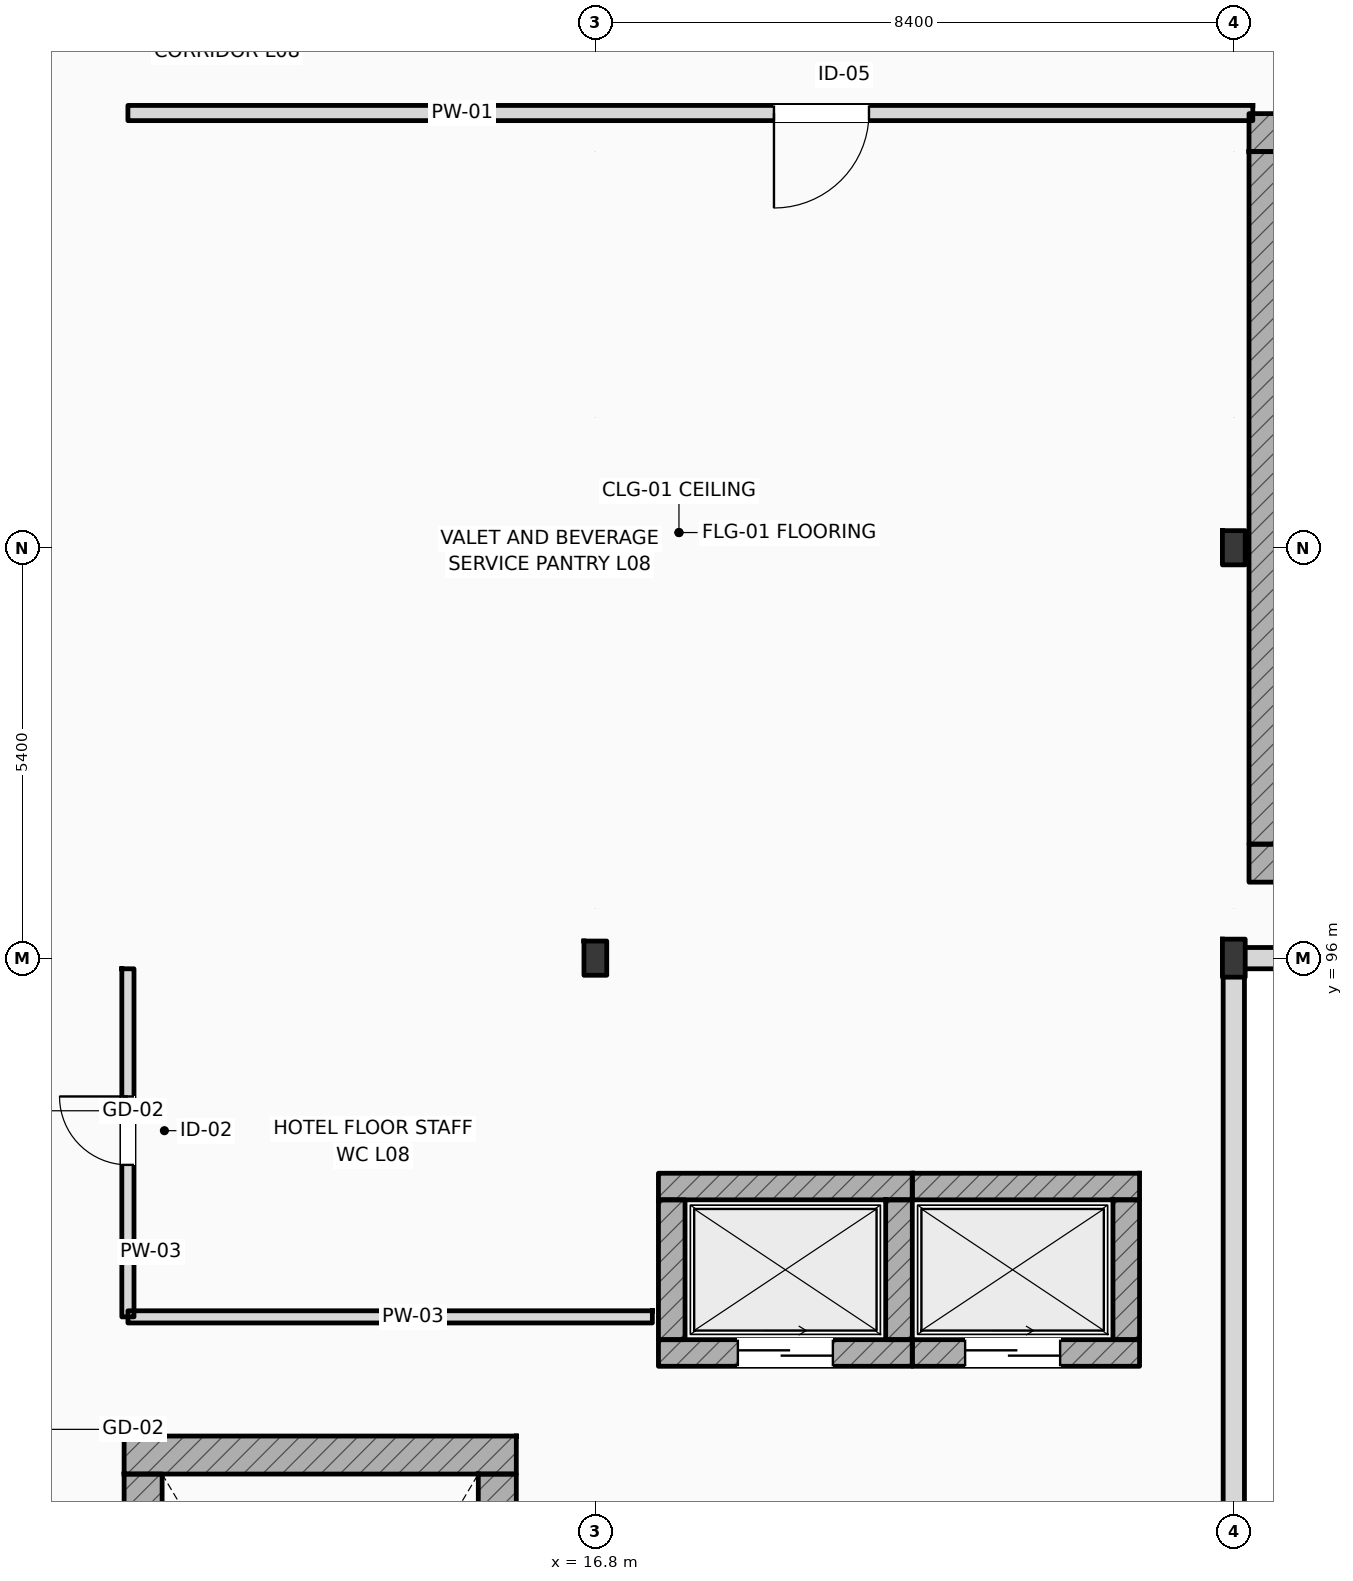
"""IFC4 building model, lengths in metres.
Left out: names, types, materials, properties, quantities, classifications, styles, units other than length and angle.
Written with IfcOpenShell. Run it as: python <this file> out.ifc"""

import sys

from ifc_helpers import new_model, si_unit, direction, frame, frame_2d, origin, origin_2d, place, context, subcontext, project, spatial, rectangle, i_section, extrude, element, fill, save


model = new_model("IFC4")
c1 = context("Model", 3, precision=1e-05, world=origin(), true_north=direction((0.0, 1.0)))
c2 = subcontext(c1, "Body", "Model", "MODEL_VIEW")
j1 = project(units=[si_unit("LENGTHUNIT", "METRE"), si_unit("PLANEANGLEUNIT", "RADIAN")], contexts=[c1])
p1 = place(None, origin())
s1 = spatial("IfcSite", under=j1, at=p1, CompositionType="ELEMENT")
p2 = place(p1, origin())
s2 = spatial("IfcBuilding", under=s1, at=p2, CompositionType="ELEMENT")
p3 = place(p2, frame((0.0, 0.0, 35.4)))
s3 = spatial("IfcBuildingStorey", under=s2, at=p3, CompositionType="ELEMENT", Elevation=35.4)
p4 = place(p3, frame((16.8, 96.0, 0.0), z_axis=(0.0, 0.0, 1.0), x_axis=(1.0, 0.0, 0.0)))
e1 = element("IfcColumn", 1, at=p4, inside=s3, PredefinedType="COLUMN", context=c2, shape_type="SweptSolid", body=[
    extrude(i_section(OverallWidth=0.3, OverallDepth=0.45, WebThickness=0.014, FlangeThickness=0.026, FilletRadius=0.027, at=origin_2d()), origin(), (0.0, 0.0, 1.0), 3.6),
])
p5 = place(p3, frame((25.2, 96.0, 0.0), z_axis=(0.0, 0.0, 1.0), x_axis=(1.0, 0.0, 0.0)))
e2 = element("IfcColumn", 2, at=p5, inside=s3, PredefinedType="COLUMN", context=c2, shape_type="SweptSolid", body=[
    extrude(i_section(OverallWidth=0.3, OverallDepth=0.5, WebThickness=0.014, FlangeThickness=0.028, FilletRadius=0.027, at=origin_2d()), origin(), (0.0, 0.0, 1.0), 3.6),
])
for number, where, z_axis, x_axis in (
    (3, (16.8, 101.4, 0.0), (0.0, 0.0, 1.0), (1.0, 0.0, 0.0)),
    (4, (25.2, 101.4, 0.0), (0.0, 0.0, 1.0), (1.0, 0.0, 0.0)),
):
    element("IfcColumn", number, at=place(p3, frame(where, z_axis=z_axis, x_axis=x_axis)), inside=s3, PredefinedType="COLUMN", context=c2, shape_type="SweptSolid", body=[
        extrude(i_section(OverallWidth=0.3, OverallDepth=0.45, WebThickness=0.014, FlangeThickness=0.026, FilletRadius=0.027, at=origin_2d()), origin(), (0.0, 0.0, 1.0), 3.6),
    ])
p6 = place(p3, frame((10.6, 89.462, 0.0), z_axis=(0.0, 0.0, 1.0), x_axis=(1.0, 0.0, 0.0)))
e5 = element("IfcWall", 5, at=p6, inside=s3, PredefinedType="SHEAR", context=c2, shape_type="SweptSolid", body=[
    extrude(rectangle(XDim=5.16, YDim=0.5, at=frame_2d((2.58, 0.0))), origin(), (0.0, 0.0, 1.0), 3.6),
])
p7 = place(p3, frame((10.85, 80.1, 0.0), z_axis=(0.0, 0.0, 1.0), x_axis=(0.0, 1.0, 0.0)))
e6 = element("IfcWall", 6, at=p7, inside=s3, PredefinedType="SHEAR", context=c2, shape_type="SweptSolid", body=[
    extrude(rectangle(XDim=9.112, YDim=0.5, at=frame_2d((4.556, 0.0))), origin(), (0.0, 0.0, 1.0), 3.6),
])
p8 = place(p3, frame((15.51, 80.1, 0.0), z_axis=(0.0, 0.0, 1.0), x_axis=(0.0, 1.0, 0.0)))
e7 = element("IfcWall", 7, at=p8, inside=s3, PredefinedType="SHEAR", context=c2, shape_type="SweptSolid", body=[
    extrude(rectangle(XDim=9.112, YDim=0.5, at=frame_2d((4.556, 0.0))), origin(), (0.0, 0.0, 1.0), 3.6),
])
p9 = place(p8, frame((0.44, 0.0, 0.0)))
e8 = element("IfcOpeningElement", 8, at=p9, cuts=e7, PredefinedType="OPENING", context=c2, shape_type="SweptSolid", body=[
    extrude(rectangle(XDim=1.1, YDim=2.2, at=frame_2d((0.55, 1.1))), frame((0.0, 0.26, 0.0), z_axis=(0.0, -1.0, 0.0), x_axis=(1.0, 0.0, 0.0)), (0.0, 0.0, 1.0), 0.52),
])
for number, where, z_axis, x_axis in (
    (9, (25.4, 106.862, 0.0), (0.0, 0.0, 1.0), (1.0, 0.0, 0.0)),
    (10, (25.4, 97.25, 0.0), (0.0, 0.0, 1.0), (1.0, 0.0, 0.0)),
):
    element("IfcWall", number, at=place(p3, frame(where, z_axis=z_axis, x_axis=x_axis)), inside=s3, PredefinedType="SHEAR", context=c2, shape_type="SweptSolid", body=[
        extrude(rectangle(XDim=5.16, YDim=0.5, at=frame_2d((2.58, 0.0))), origin(), (0.0, 0.0, 1.0), 3.6),
    ])
p10 = place(p3, frame((25.65, 97.5, 0.0), z_axis=(0.0, 0.0, 1.0), x_axis=(0.0, 1.0, 0.0)))
e11 = element("IfcWall", 11, at=p10, inside=s3, PredefinedType="SHEAR", context=c2, shape_type="SweptSolid", body=[
    extrude(rectangle(XDim=9.112, YDim=0.5, at=frame_2d((4.556, 0.0))), origin(), (0.0, 0.0, 1.0), 3.6),
])
p11 = place(p3, frame((25.2, 96.0, 0.0), z_axis=(0.0, 0.0, 1.0), x_axis=(1.0, 0.0, 0.0)))
e12 = element("IfcWall", 12, at=p11, inside=s3, PredefinedType="STANDARD", context=c2, shape_type="SweptSolid", body=[
    extrude(rectangle(XDim=70.2, YDim=0.28, at=frame_2d((35.1, 0.0))), origin(), (0.0, 0.0, 1.0), 2.92),
])
p12 = place(p11, frame((16.694, 0.0, 0.9)))
e13 = element("IfcOpeningElement", 13, at=p12, cuts=e12, PredefinedType="OPENING", context=c2, shape_type="SweptSolid", body=[
    extrude(rectangle(XDim=1.8, YDim=1.84, at=frame_2d((0.9, 0.92))), frame((0.0, 0.15, 0.0), z_axis=(0.0, -1.0, 0.0), x_axis=(1.0, 0.0, 0.0)), (0.0, 0.0, 1.0), 0.3),
])
p13 = place(p11, frame((20.482, 0.0, 0.9)))
e14 = element("IfcOpeningElement", 14, at=p13, cuts=e12, PredefinedType="OPENING", context=c2, shape_type="SweptSolid", body=[
    extrude(rectangle(XDim=1.95, YDim=1.84, at=frame_2d((0.975, 0.92))), frame((0.0, 0.15, 0.0), z_axis=(0.0, -1.0, 0.0), x_axis=(1.0, 0.0, 0.0)), (0.0, 0.0, 1.0), 0.3),
])
p14 = place(p11, frame((24.316, 0.0, 0.9)))
e15 = element("IfcOpeningElement", 15, at=p14, cuts=e12, PredefinedType="OPENING", context=c2, shape_type="SweptSolid", body=[
    extrude(rectangle(XDim=2.1, YDim=1.84, at=frame_2d((1.05, 0.92))), frame((0.0, 0.15, 0.0), z_axis=(0.0, -1.0, 0.0), x_axis=(1.0, 0.0, 0.0)), (0.0, 0.0, 1.0), 0.3),
])
p15 = place(p11, frame((28.149, 0.0, 0.9)))
e16 = element("IfcOpeningElement", 16, at=p15, cuts=e12, PredefinedType="OPENING", context=c2, shape_type="SweptSolid", body=[
    extrude(rectangle(XDim=2.25, YDim=1.84, at=frame_2d((1.125, 0.92))), frame((0.0, 0.15, 0.0), z_axis=(0.0, -1.0, 0.0), x_axis=(1.0, 0.0, 0.0)), (0.0, 0.0, 1.0), 0.3),
])
p16 = place(p11, frame((31.983, 0.0, 0.9)))
e17 = element("IfcOpeningElement", 17, at=p16, cuts=e12, PredefinedType="OPENING", context=c2, shape_type="SweptSolid", body=[
    extrude(rectangle(XDim=2.4, YDim=1.84, at=frame_2d((1.2, 0.92))), frame((0.0, 0.15, 0.0), z_axis=(0.0, -1.0, 0.0), x_axis=(1.0, 0.0, 0.0)), (0.0, 0.0, 1.0), 0.3),
])
p17 = place(p11, frame((35.682, 0.0, 0.9)))
e18 = element("IfcOpeningElement", 18, at=p17, cuts=e12, PredefinedType="OPENING", context=c2, shape_type="SweptSolid", body=[
    extrude(rectangle(XDim=2.508, YDim=1.84, at=frame_2d((1.254, 0.92))), frame((0.0, 0.15, 0.0), z_axis=(0.0, -1.0, 0.0), x_axis=(1.0, 0.0, 0.0)), (0.0, 0.0, 1.0), 0.3),
])
p18 = place(p11, frame((55.56, 0.0, 0.9)))
e19 = element("IfcOpeningElement", 19, at=p18, cuts=e12, PredefinedType="OPENING", context=c2, shape_type="SweptSolid", body=[
    extrude(rectangle(XDim=1.8, YDim=1.84, at=frame_2d((0.9, 0.92))), frame((0.0, 0.15, 0.0), z_axis=(0.0, -1.0, 0.0), x_axis=(1.0, 0.0, 0.0)), (0.0, 0.0, 1.0), 0.3),
])
p19 = place(p11, frame((58.628, 0.0, 0.9)))
e20 = element("IfcOpeningElement", 20, at=p19, cuts=e12, PredefinedType="OPENING", context=c2, shape_type="SweptSolid", body=[
    extrude(rectangle(XDim=2.809, YDim=1.84, at=frame_2d((1.405, 0.92))), frame((0.0, 0.15, 0.0), z_axis=(0.0, -1.0, 0.0), x_axis=(1.0, 0.0, 0.0)), (0.0, 0.0, 1.0), 0.3),
])
p20 = place(p11, frame((63.257, 0.0, 0.9)))
e21 = element("IfcOpeningElement", 21, at=p20, cuts=e12, PredefinedType="OPENING", context=c2, shape_type="SweptSolid", body=[
    extrude(rectangle(XDim=1.8, YDim=1.84, at=frame_2d((0.9, 0.92))), frame((0.0, 0.15, 0.0), z_axis=(0.0, -1.0, 0.0), x_axis=(1.0, 0.0, 0.0)), (0.0, 0.0, 1.0), 0.3),
])
p21 = place(p11, frame((66.453, 0.0, 0.9)))
e22 = element("IfcOpeningElement", 22, at=p21, cuts=e12, PredefinedType="OPENING", context=c2, shape_type="SweptSolid", body=[
    extrude(rectangle(XDim=2.737, YDim=1.84, at=frame_2d((1.369, 0.92))), frame((0.0, 0.15, 0.0), z_axis=(0.0, -1.0, 0.0), x_axis=(1.0, 0.0, 0.0)), (0.0, 0.0, 1.0), 0.3),
])
p22 = place(p3, frame((25.2, 79.5, 0.0), z_axis=(0.0, 0.0, 1.0), x_axis=(0.0, 1.0, 0.0)))
e23 = element("IfcWall", 23, at=p22, inside=s3, PredefinedType="STANDARD", context=c2, shape_type="SweptSolid", body=[
    extrude(rectangle(XDim=16.5, YDim=0.28, at=frame_2d((8.25, 0.0))), origin(), (0.0, 0.0, 1.0), 3.01),
])
p23 = place(p3, frame((17.63, 92.995, 0.0), z_axis=(0.0, 0.0, 1.0), x_axis=(1.0, 0.0, 0.0)))
e24 = element("IfcWall", 24, at=p23, inside=s3, PredefinedType="SHEAR", context=c2, shape_type="SweptSolid", body=[
    extrude(rectangle(XDim=3.34, YDim=0.35, at=frame_2d((1.67, 0.0))), origin(), (0.0, 0.0, 1.0), 3.38),
])
p24 = place(p3, frame((17.63, 90.805, 0.0), z_axis=(0.0, 0.0, 1.0), x_axis=(1.0, 0.0, 0.0)))
e25 = element("IfcWall", 25, at=p24, inside=s3, PredefinedType="SHEAR", context=c2, shape_type="SweptSolid", body=[
    extrude(rectangle(XDim=3.34, YDim=0.35, at=frame_2d((1.67, 0.0))), origin(), (0.0, 0.0, 1.0), 3.38),
])
p25 = place(p24, frame((1.045, 0.0, 0.0)))
e26 = element("IfcOpeningElement", 26, at=p25, cuts=e25, PredefinedType="OPENING", context=c2, shape_type="SweptSolid", body=[
    extrude(rectangle(XDim=1.25, YDim=2.25, at=frame_2d((0.625, 1.125))), frame((0.0, 0.185, 0.0), z_axis=(0.0, -1.0, 0.0), x_axis=(1.0, 0.0, 0.0)), (0.0, 0.0, 1.0), 0.37),
])
for number, where, z_axis, x_axis in (
    (27, (17.805, 90.98, 0.0), (0.0, 0.0, 1.0), (0.0, 1.0, 0.0)),
    (28, (20.795, 90.98, 0.0), (0.0, 0.0, 1.0), (0.0, 1.0, 0.0)),
):
    element("IfcWall", number, at=place(p3, frame(where, z_axis=z_axis, x_axis=x_axis)), inside=s3, PredefinedType="SHEAR", context=c2, shape_type="SweptSolid", body=[
        extrude(rectangle(XDim=1.84, YDim=0.35, at=frame_2d((0.92, 0.0))), origin(), (0.0, 0.0, 1.0), 3.38),
    ])
p26 = place(p3, frame((20.97, 92.995, 0.0), z_axis=(0.0, 0.0, 1.0), x_axis=(1.0, 0.0, 0.0)))
e29 = element("IfcWall", 29, at=p26, inside=s3, PredefinedType="SHEAR", context=c2, shape_type="SweptSolid", body=[
    extrude(rectangle(XDim=2.99, YDim=0.35, at=frame_2d((1.495, 0.0))), origin(), (0.0, 0.0, 1.0), 3.38),
])
p27 = place(p3, frame((20.97, 90.805, 0.0), z_axis=(0.0, 0.0, 1.0), x_axis=(1.0, 0.0, 0.0)))
e30 = element("IfcWall", 30, at=p27, inside=s3, PredefinedType="SHEAR", context=c2, shape_type="SweptSolid", body=[
    extrude(rectangle(XDim=2.99, YDim=0.35, at=frame_2d((1.495, 0.0))), origin(), (0.0, 0.0, 1.0), 3.38),
])
p28 = place(p27, frame((0.695, 0.0, 0.0)))
e31 = element("IfcOpeningElement", 31, at=p28, cuts=e30, PredefinedType="OPENING", context=c2, shape_type="SweptSolid", body=[
    extrude(rectangle(XDim=1.25, YDim=2.25, at=frame_2d((0.625, 1.125))), frame((0.0, 0.185, 0.0), z_axis=(0.0, -1.0, 0.0), x_axis=(1.0, 0.0, 0.0)), (0.0, 0.0, 1.0), 0.37),
])
p29 = place(p3, frame((23.785, 90.98, 0.0), z_axis=(0.0, 0.0, 1.0), x_axis=(0.0, 1.0, 0.0)))
e32 = element("IfcWall", 32, at=p29, inside=s3, PredefinedType="SHEAR", context=c2, shape_type="SweptSolid", body=[
    extrude(rectangle(XDim=1.84, YDim=0.35, at=frame_2d((0.92, 0.0))), origin(), (0.0, 0.0, 1.0), 3.38),
])
p30 = place(p3, frame((10.65, 107.12, 0.0), z_axis=(0.0, 0.0, 1.0), x_axis=(1.0, 0.0, 0.0)))
e33 = element("IfcWall", 33, at=p30, inside=s3, PredefinedType="PARTITIONING", context=c2, shape_type="SweptSolid", body=[
    extrude(rectangle(XDim=14.8, YDim=0.2, at=frame_2d((7.4, 0.0))), origin(), (0.0, 0.0, 1.0), 3.38),
])
p31 = place(p30, frame((8.5, 0.0, 0.0)))
e34 = element("IfcOpeningElement", 34, at=p31, cuts=e33, PredefinedType="OPENING", context=c2, shape_type="SweptSolid", body=[
    extrude(rectangle(XDim=1.25, YDim=2.15, at=frame_2d((0.625, 1.075))), frame((0.0, 0.11, 0.0), z_axis=(0.0, -1.0, 0.0), x_axis=(1.0, 0.0, 0.0)), (0.0, 0.0, 1.0), 0.22),
])
p32 = place(p3, frame((10.65, 91.28, 0.0), z_axis=(0.0, 0.0, 1.0), x_axis=(0.0, 1.0, 0.0)))
e35 = element("IfcWall", 35, at=p32, inside=s3, PredefinedType="PARTITIONING", context=c2, shape_type="SweptSolid", body=[
    extrude(rectangle(XDim=4.58, YDim=0.16, at=frame_2d((2.29, 0.0))), origin(), (0.0, 0.0, 1.0), 3.38),
])
p33 = place(p32, frame((2.0, 0.0, 0.0)))
e36 = element("IfcOpeningElement", 36, at=p33, cuts=e35, PredefinedType="OPENING", context=c2, shape_type="SweptSolid", body=[
    extrude(rectangle(XDim=0.9, YDim=2.1, at=frame_2d((0.45, 1.05))), frame((0.0, 0.09, 0.0), z_axis=(0.0, -1.0, 0.0), x_axis=(1.0, 0.0, 0.0)), (0.0, 0.0, 1.0), 0.18),
])
p34 = place(p3, frame((10.65, 91.28, 0.0), z_axis=(0.0, 0.0, 1.0), x_axis=(1.0, 0.0, 0.0)))
e37 = element("IfcWall", 37, at=p34, inside=s3, PredefinedType="PARTITIONING", context=c2, shape_type="SweptSolid", body=[
    extrude(rectangle(XDim=6.9, YDim=0.16, at=frame_2d((3.45, 0.0))), origin(), (0.0, 0.0, 1.0), 3.38),
])
p35 = place(p25, origin())
e38 = element("IfcDoor", 38, at=p35, inside=s3, OperationType="SLIDING_TO_LEFT", PredefinedType="DOOR", context=c2, shape_type="SweptSolid", body=[
    extrude(rectangle(XDim=1.25, YDim=2.25, at=frame_2d((0.625, 1.125))), frame((0.0, 0.025, 0.0), z_axis=(0.0, -1.0, 0.0), x_axis=(1.0, 0.0, 0.0)), (0.0, 0.0, 1.0), 0.05),
])
fill(e26, e38)
p36 = place(p28, origin())
e39 = element("IfcDoor", 39, at=p36, inside=s3, OperationType="SLIDING_TO_LEFT", PredefinedType="DOOR", context=c2, shape_type="SweptSolid", body=[
    extrude(rectangle(XDim=1.25, YDim=2.25, at=frame_2d((0.625, 1.125))), frame((0.0, 0.025, 0.0), z_axis=(0.0, -1.0, 0.0), x_axis=(1.0, 0.0, 0.0)), (0.0, 0.0, 1.0), 0.05),
])
fill(e31, e39)
p37 = place(p33, origin())
e40 = element("IfcDoor", 40, at=p37, inside=s3, OperationType="SINGLE_SWING_RIGHT", PredefinedType="DOOR", context=c2, shape_type="SweptSolid", body=[
    extrude(rectangle(XDim=0.9, YDim=2.1, at=frame_2d((0.45, 1.05))), frame((0.0, 0.025, 0.0), z_axis=(0.0, -1.0, 0.0), x_axis=(1.0, 0.0, 0.0)), (0.0, 0.0, 1.0), 0.05),
])
fill(e36, e40)
p38 = place(p31, frame((1.25, 0.0, 0.0), z_axis=(0.0, 0.0, 1.0), x_axis=(-1.0, 0.0, 0.0)))
e41 = element("IfcDoor", 41, at=p38, inside=s3, OperationType="SINGLE_SWING_LEFT", PredefinedType="DOOR", context=c2, shape_type="SweptSolid", body=[
    extrude(rectangle(XDim=1.25, YDim=2.15, at=frame_2d((0.625, 1.075))), frame((0.0, 0.025, 0.0), z_axis=(0.0, -1.0, 0.0), x_axis=(1.0, 0.0, 0.0)), (0.0, 0.0, 1.0), 0.05),
])
fill(e34, e41)
save(model, sys.argv[1])
